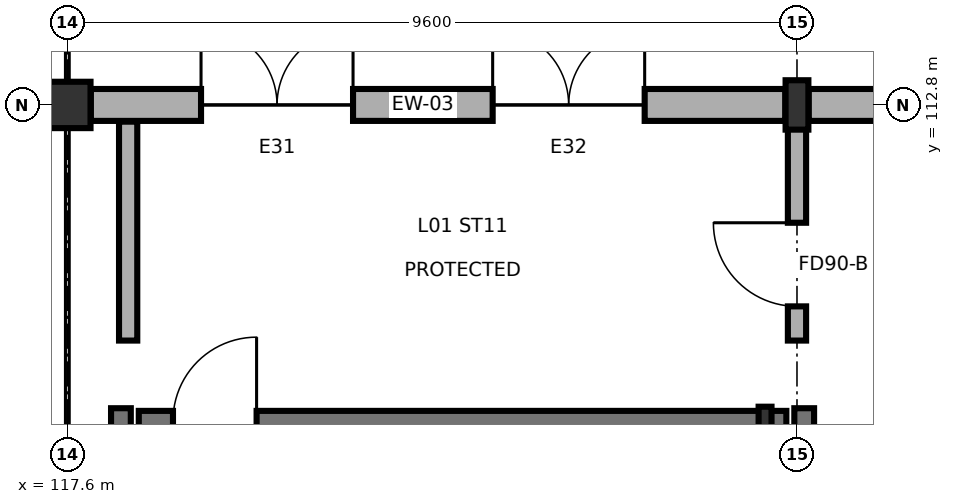
"""IFC4 building model, lengths in metres.
Left out: names, types, materials, properties, quantities, classifications, styles, units other than length and angle.
Written with IfcOpenShell. Run it as: python <this file> out.ifc"""

import sys

from ifc_helpers import new_model, si_unit, direction, frame, frame_2d, origin, origin_2d, place, context, subcontext, project, spatial, rectangle, hollow_circle, i_section, extrude, element, fill, save


model = new_model("IFC4")
c1 = context("Model", 3, precision=1e-05, world=origin(), true_north=direction((0.0, 1.0)))
c2 = subcontext(c1, "Body", "Model", "MODEL_VIEW")
j1 = project(units=[si_unit("LENGTHUNIT", "METRE"), si_unit("PLANEANGLEUNIT", "RADIAN")], contexts=[c1])
p1 = place(None, origin())
s1 = spatial("IfcSite", under=j1, at=p1, CompositionType="ELEMENT")
p2 = place(p1, origin())
s2 = spatial("IfcBuilding", under=s1, at=p2, CompositionType="ELEMENT")
p3 = place(p2, origin())
s3 = spatial("IfcBuildingStorey", under=s2, at=p3, CompositionType="ELEMENT", Elevation=0.0)
p4 = place(p3, frame((117.6, 112.8, 0.0), z_axis=(0.0, 0.0, 1.0), x_axis=(1.0, 0.0, 0.0)))
e1 = element("IfcColumn", 1, at=p4, inside=s3, PredefinedType="COLUMN", context=c2, shape_type="SweptSolid", body=[
    extrude(hollow_circle(Radius=0.305, WallThickness=0.025, at=origin_2d()), origin(), (0.0, 0.0, 1.0), 5.4),
])
p5 = place(p3, frame((127.2, 112.8, 0.0), z_axis=(0.0, 0.0, 1.0), x_axis=(1.0, 0.0, 0.0)))
e2 = element("IfcColumn", 2, at=p5, inside=s3, PredefinedType="COLUMN", context=c2, shape_type="SweptSolid", body=[
    extrude(i_section(OverallWidth=0.3, OverallDepth=0.65, WebThickness=0.016, FlangeThickness=0.031, FilletRadius=0.027, at=origin_2d()), origin(), (0.0, 0.0, 1.0), 5.4),
])
p6 = place(p3, frame((126.78, 108.65, 0.0), z_axis=(0.0, 0.0, 1.0), x_axis=(1.0, 0.0, 0.0)))
e3 = element("IfcColumn", 3, at=p6, inside=s3, PredefinedType="PILASTER", context=c2, shape_type="SweptSolid", body=[
    extrude(i_section(OverallWidth=0.17, OverallDepth=0.36, WebThickness=0.008, FlangeThickness=0.013, FilletRadius=0.018, at=origin_2d()), origin(), (0.0, 0.0, 1.0), 5.4),
])
p7 = place(p3, frame((117.909, 112.8, 0.0), z_axis=(0.0, 0.0, 1.0), x_axis=(1.0, 0.0, 0.0)))
e4 = element("IfcWall", 4, at=p7, inside=s3, PredefinedType="SOLIDWALL", context=c2, shape_type="SweptSolid", body=[
    extrude(rectangle(XDim=9.137, YDim=0.42, at=frame_2d((4.568, 0.0))), origin(), (0.0, 0.0, 1.0), 4.685),
])
p8 = place(p7, frame((1.45, 0.0, 0.0)))
e5 = element("IfcOpeningElement", 5, at=p8, cuts=e4, PredefinedType="OPENING", context=c2, shape_type="SweptSolid", body=[
    extrude(rectangle(XDim=2.0, YDim=2.3, at=frame_2d((1.0, 1.15))), frame((0.0, 0.22, 0.0), z_axis=(0.0, -1.0, 0.0), x_axis=(1.0, 0.0, 0.0)), (0.0, 0.0, 1.0), 0.44),
])
p9 = place(p7, frame((5.287, 0.0, 0.0)))
e6 = element("IfcOpeningElement", 6, at=p9, cuts=e4, PredefinedType="OPENING", context=c2, shape_type="SweptSolid", body=[
    extrude(rectangle(XDim=2.0, YDim=2.3, at=frame_2d((1.0, 1.15))), frame((0.0, 0.22, 0.0), z_axis=(0.0, -1.0, 0.0), x_axis=(1.0, 0.0, 0.0)), (0.0, 0.0, 1.0), 0.44),
])
p10 = place(p3, frame((127.354, 112.8, 0.0), z_axis=(0.0, 0.0, 1.0), x_axis=(1.0, 0.0, 0.0)))
e7 = element("IfcWall", 7, at=p10, inside=s3, PredefinedType="SOLIDWALL", context=c2, shape_type="SweptSolid", body=[
    extrude(rectangle(XDim=9.292, YDim=0.42, at=frame_2d((4.646, 0.0))), origin(), (0.0, 0.0, 1.0), 4.685),
])
p11 = place(p10, frame((1.898, 0.0, 0.75)))
e8 = element("IfcOpeningElement", 8, at=p11, cuts=e7, PredefinedType="OPENING", context=c2, shape_type="SweptSolid", body=[
    extrude(rectangle(XDim=2.0, YDim=1.5, at=frame_2d((1.0, 0.75))), frame((0.0, 0.22, 0.0), z_axis=(0.0, -1.0, 0.0), x_axis=(1.0, 0.0, 0.0)), (0.0, 0.0, 1.0), 0.44),
])
p12 = place(p10, frame((5.394, 0.0, 0.75)))
e9 = element("IfcOpeningElement", 9, at=p12, cuts=e7, PredefinedType="OPENING", context=c2, shape_type="SweptSolid", body=[
    extrude(rectangle(XDim=2.0, YDim=1.5, at=frame_2d((1.0, 0.75))), frame((0.0, 0.22, 0.0), z_axis=(0.0, -1.0, 0.0), x_axis=(1.0, 0.0, 0.0)), (0.0, 0.0, 1.0), 0.44),
])
for number, where, z_axis, x_axis in (
    (10, (118.305, 104.54, 0.0), (0.0, 0.0, 1.0), (0.0, 1.0, 0.0)),
    (11, (127.295, 104.54, 0.0), (0.0, 0.0, 1.0), (0.0, 1.0, 0.0)),
):
    element("IfcWall", number, at=place(p3, frame(where, z_axis=z_axis, x_axis=x_axis)), inside=s3, PredefinedType="SHEAR", context=c2, shape_type="SweptSolid", body=[
        extrude(rectangle(XDim=4.27, YDim=0.26, at=frame_2d((2.135, 0.0))), origin(), (0.0, 0.0, 1.0), 5.14),
    ])
p13 = place(p3, frame((118.54, 108.645, 0.0), z_axis=(0.0, 0.0, 1.0), x_axis=(1.0, 0.0, 0.0)))
e12 = element("IfcWall", 12, at=p13, inside=s3, PredefinedType="SHEAR", context=c2, shape_type="SweptSolid", body=[
    extrude(rectangle(XDim=8.52, YDim=0.26, at=frame_2d((4.26, 0.0))), origin(), (0.0, 0.0, 1.0), 5.14),
])
p14 = place(p13, frame((0.45, 0.0, 0.0)))
e13 = element("IfcOpeningElement", 13, at=p14, cuts=e12, PredefinedType="OPENING", context=c2, shape_type="SweptSolid", body=[
    extrude(rectangle(XDim=1.1, YDim=2.2, at=frame_2d((0.55, 1.1))), frame((0.0, 0.14, 0.0), z_axis=(0.0, -1.0, 0.0), x_axis=(1.0, 0.0, 0.0)), (0.0, 0.0, 1.0), 0.28),
])
p15 = place(p3, frame((118.4, 109.7, 0.0), z_axis=(0.0, 0.0, 1.0), x_axis=(0.0, 1.0, 0.0)))
e14 = element("IfcWall", 14, at=p15, inside=s3, PredefinedType="SOLIDWALL", context=c2, shape_type="SweptSolid", body=[
    extrude(rectangle(XDim=2.88, YDim=0.24, at=frame_2d((1.44, 0.0))), origin(), (0.0, 0.0, 1.0), 5.14),
])
p16 = place(p3, frame((127.2, 109.7, 0.0), z_axis=(0.0, 0.0, 1.0), x_axis=(0.0, 1.0, 0.0)))
e15 = element("IfcWall", 15, at=p16, inside=s3, PredefinedType="SOLIDWALL", context=c2, shape_type="SweptSolid", body=[
    extrude(rectangle(XDim=2.88, YDim=0.24, at=frame_2d((1.44, 0.0))), origin(), (0.0, 0.0, 1.0), 5.14),
])
p17 = place(p16, frame((0.45, 0.0, 0.0)))
e16 = element("IfcOpeningElement", 16, at=p17, cuts=e15, PredefinedType="OPENING", context=c2, shape_type="SweptSolid", body=[
    extrude(rectangle(XDim=1.1, YDim=2.2, at=frame_2d((0.55, 1.1))), frame((0.0, 0.13, 0.0), z_axis=(0.0, -1.0, 0.0), x_axis=(1.0, 0.0, 0.0)), (0.0, 0.0, 1.0), 0.26),
])
p18 = place(p8, origin())
e17 = element("IfcDoor", 17, at=p18, inside=s3, OperationType="DOUBLE_DOOR_SINGLE_SWING", PredefinedType="DOOR", context=c2, shape_type="SweptSolid", body=[
    extrude(rectangle(XDim=2.0, YDim=2.3, at=frame_2d((1.0, 1.15))), frame((0.0, 0.025, 0.0), z_axis=(0.0, -1.0, 0.0), x_axis=(1.0, 0.0, 0.0)), (0.0, 0.0, 1.0), 0.05),
])
fill(e5, e17)
p19 = place(p9, origin())
e18 = element("IfcDoor", 18, at=p19, inside=s3, OperationType="DOUBLE_DOOR_SINGLE_SWING", PredefinedType="DOOR", context=c2, shape_type="SweptSolid", body=[
    extrude(rectangle(XDim=2.0, YDim=2.3, at=frame_2d((1.0, 1.15))), frame((0.0, 0.025, 0.0), z_axis=(0.0, -1.0, 0.0), x_axis=(1.0, 0.0, 0.0)), (0.0, 0.0, 1.0), 0.05),
])
fill(e6, e18)
p20 = place(p14, origin())
e19 = element("IfcDoor", 19, at=p20, inside=s3, OperationType="SINGLE_SWING_RIGHT", PredefinedType="DOOR", context=c2, shape_type="SweptSolid", body=[
    extrude(rectangle(XDim=1.1, YDim=2.2, at=frame_2d((0.55, 1.1))), frame((0.0, 0.025, 0.0), z_axis=(0.0, -1.0, 0.0), x_axis=(1.0, 0.0, 0.0)), (0.0, 0.0, 1.0), 0.05),
])
fill(e13, e19)
p21 = place(p17, origin())
e20 = element("IfcDoor", 20, at=p21, inside=s3, OperationType="SINGLE_SWING_RIGHT", PredefinedType="DOOR", context=c2, shape_type="SweptSolid", body=[
    extrude(rectangle(XDim=1.1, YDim=2.2, at=frame_2d((0.55, 1.1))), frame((0.0, 0.025, 0.0), z_axis=(0.0, -1.0, 0.0), x_axis=(1.0, 0.0, 0.0)), (0.0, 0.0, 1.0), 0.05),
])
fill(e16, e20)
save(model, sys.argv[1])
